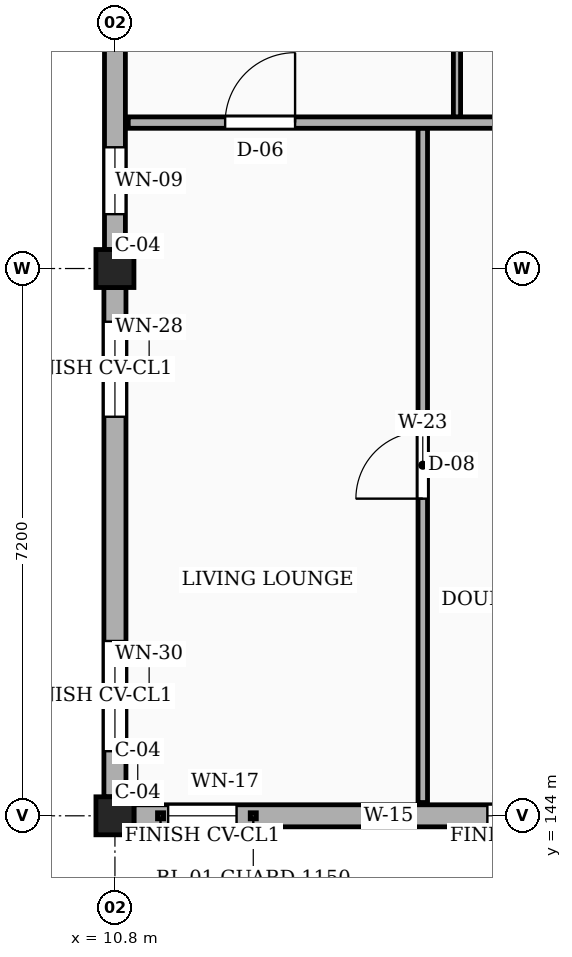
"""IFC4 building model, lengths in metres.
Left out: names, types, materials, properties, quantities, classifications, styles, units other than length and angle.
Written with IfcOpenShell. Run it as: python <this file> out.ifc"""

import sys

from ifc_helpers import new_model, si_unit, direction, frame, frame_2d, origin, origin_2d, place, context, subcontext, project, spatial, rectangle, extrude, element, fill, save


model = new_model("IFC4")
c1 = context("Model", 3, precision=1e-05, world=origin(), true_north=direction((0.0, 1.0)))
c2 = subcontext(c1, "Body", "Model", "MODEL_VIEW")
j1 = project(units=[si_unit("LENGTHUNIT", "METRE"), si_unit("PLANEANGLEUNIT", "RADIAN")], contexts=[c1])
p1 = place(None, origin())
s1 = spatial("IfcSite", under=j1, at=p1, CompositionType="ELEMENT")
p2 = place(p1, origin())
s2 = spatial("IfcBuilding", under=s1, at=p2, CompositionType="ELEMENT")
p3 = place(p2, frame((0.0, 0.0, 32.85)))
s3 = spatial("IfcBuildingStorey", under=s2, at=p3, CompositionType="ELEMENT", Elevation=32.85)
for number, where, z_axis, x_axis in (
    (1, (10.8, 144.0, 0.0), (0.0, 0.0, 1.0), (1.0, 0.0, 0.0)),
    (2, (10.8, 151.2, 0.0), (0.0, 0.0, 1.0), (1.0, 0.0, 0.0)),
):
    element("IfcColumn", number, at=place(p3, frame(where, z_axis=z_axis, x_axis=x_axis)), inside=s3, PredefinedType="COLUMN", context=c2, shape_type="SweptSolid", body=[
        extrude(rectangle(XDim=0.5, YDim=0.5, at=origin_2d()), origin(), (0.0, 0.0, 1.0), 3.15),
    ])
p4 = place(p3, frame((11.05, 144.0, 0.0), z_axis=(0.0, 0.0, 1.0), x_axis=(1.0, 0.0, 0.0)))
e3 = element("IfcWall", 3, at=p4, inside=s3, PredefinedType="SOLIDWALL", context=c2, shape_type="SweptSolid", body=[
    extrude(rectangle(XDim=6.7, YDim=0.29, at=frame_2d((3.35, 0.0))), origin(), (0.0, 0.0, 1.0), 2.455),
])
p5 = place(p4, frame((0.45, 0.0, 0.78)))
e4 = element("IfcOpeningElement", 4, at=p5, cuts=e3, PredefinedType="OPENING", context=c2, shape_type="SweptSolid", body=[
    extrude(rectangle(XDim=0.9, YDim=1.36, at=frame_2d((0.45, 0.68))), frame((0.0, 0.155, 0.0), z_axis=(0.0, -1.0, 0.0), x_axis=(1.0, 0.0, 0.0)), (0.0, 0.0, 1.0), 0.31),
])
p6 = place(p4, frame((4.65, 0.0, 0.78)))
e5 = element("IfcOpeningElement", 5, at=p6, cuts=e3, PredefinedType="OPENING", context=c2, shape_type="SweptSolid", body=[
    extrude(rectangle(XDim=1.06, YDim=1.36, at=frame_2d((0.53, 0.68))), frame((0.0, 0.155, 0.0), z_axis=(0.0, -1.0, 0.0), x_axis=(1.0, 0.0, 0.0)), (0.0, 0.0, 1.0), 0.31),
])
p7 = place(p3, frame((10.8, 158.15, 0.0), z_axis=(0.0, 0.0, 1.0), x_axis=(0.0, -1.0, 0.0)))
e6 = element("IfcWall", 6, at=p7, inside=s3, PredefinedType="SOLIDWALL", context=c2, shape_type="SweptSolid", body=[
    extrude(rectangle(XDim=6.7, YDim=0.275, at=frame_2d((3.35, 0.0))), origin(), (0.0, 0.0, 1.0), 2.455),
])
p8 = place(p7, frame((0.525, 0.0, 0.78)))
e7 = element("IfcOpeningElement", 7, at=p8, cuts=e6, PredefinedType="OPENING", context=c2, shape_type="SweptSolid", body=[
    extrude(rectangle(XDim=0.94, YDim=1.44, at=frame_2d((0.47, 0.72))), frame((0.0, 0.147, 0.0), z_axis=(0.0, -1.0, 0.0), x_axis=(1.0, 0.0, 0.0)), (0.0, 0.0, 1.0), 0.295),
])
p9 = place(p7, frame((2.865, 0.0, 0.78)))
e8 = element("IfcOpeningElement", 8, at=p9, cuts=e6, PredefinedType="OPENING", context=c2, shape_type="SweptSolid", body=[
    extrude(rectangle(XDim=1.15, YDim=1.44, at=frame_2d((0.575, 0.72))), frame((0.0, 0.147, 0.0), z_axis=(0.0, -1.0, 0.0), x_axis=(1.0, 0.0, 0.0)), (0.0, 0.0, 1.0), 0.295),
])
p10 = place(p7, frame((5.355, 0.0, 0.78)))
e9 = element("IfcOpeningElement", 9, at=p10, cuts=e6, PredefinedType="OPENING", context=c2, shape_type="SweptSolid", body=[
    extrude(rectangle(XDim=0.88, YDim=1.26, at=frame_2d((0.44, 0.63))), frame((0.0, 0.147, 0.0), z_axis=(0.0, -1.0, 0.0), x_axis=(1.0, 0.0, 0.0)), (0.0, 0.0, 1.0), 0.295),
])
p11 = place(p3, frame((10.8, 150.95, 0.0), z_axis=(0.0, 0.0, 1.0), x_axis=(0.0, -1.0, 0.0)))
e10 = element("IfcWall", 10, at=p11, inside=s3, PredefinedType="SOLIDWALL", context=c2, shape_type="SweptSolid", body=[
    extrude(rectangle(XDim=6.7, YDim=0.29, at=frame_2d((3.35, 0.0))), origin(), (0.0, 0.0, 1.0), 2.455),
])
p12 = place(p11, frame((0.45, 0.0, 0.78)))
e11 = element("IfcOpeningElement", 11, at=p12, cuts=e10, PredefinedType="OPENING", context=c2, shape_type="SweptSolid", body=[
    extrude(rectangle(XDim=1.25, YDim=1.44, at=frame_2d((0.625, 0.72))), frame((0.0, 0.155, 0.0), z_axis=(0.0, -1.0, 0.0), x_axis=(1.0, 0.0, 0.0)), (0.0, 0.0, 1.0), 0.31),
])
p13 = place(p11, frame((4.65, 0.0, 0.78)))
e12 = element("IfcOpeningElement", 12, at=p13, cuts=e10, PredefinedType="OPENING", context=c2, shape_type="SweptSolid", body=[
    extrude(rectangle(XDim=1.45, YDim=1.44, at=frame_2d((0.725, 0.72))), frame((0.0, 0.155, 0.0), z_axis=(0.0, -1.0, 0.0), x_axis=(1.0, 0.0, 0.0)), (0.0, 0.0, 1.0), 0.31),
])
p14 = place(p3, frame((14.85, 144.175, 0.0), z_axis=(0.0, 0.0, 1.0), x_axis=(0.0, 1.0, 0.0)))
e13 = element("IfcWall", 13, at=p14, inside=s3, PredefinedType="PARTITIONING", context=c2, shape_type="SweptSolid", body=[
    extrude(rectangle(XDim=8.875, YDim=0.125, at=frame_2d((4.438, 0.0))), origin(), (0.0, 0.0, 1.0), 2.32),
])
p15 = place(p14, frame((3.998, 0.0, 0.0)))
e14 = element("IfcOpeningElement", 14, at=p15, cuts=e13, PredefinedType="OPENING", context=c2, shape_type="SweptSolid", body=[
    extrude(rectangle(XDim=0.88, YDim=2.08, at=frame_2d((0.44, 1.04))), frame((0.0, 0.073, 0.0), z_axis=(0.0, -1.0, 0.0), x_axis=(1.0, 0.0, 0.0)), (0.0, 0.0, 1.0), 0.145),
])
p16 = place(p3, frame((15.3, 153.19, 0.0), z_axis=(0.0, 0.0, 1.0), x_axis=(0.0, 1.0, 0.0)))
e15 = element("IfcWall", 15, at=p16, inside=s3, PredefinedType="PARTITIONING", context=c2, shape_type="SweptSolid", body=[
    extrude(rectangle(XDim=3.02, YDim=0.095, at=frame_2d((1.51, 0.0))), origin(), (0.0, 0.0, 1.0), 2.32),
])
p17 = place(p16, frame((1.075, 0.0, 0.0)))
e16 = element("IfcOpeningElement", 16, at=p17, cuts=e15, PredefinedType="OPENING", context=c2, shape_type="SweptSolid", body=[
    extrude(rectangle(XDim=0.87, YDim=2.05, at=frame_2d((0.435, 1.025))), frame((0.0, 0.058, 0.0), z_axis=(0.0, -1.0, 0.0), x_axis=(1.0, 0.0, 0.0)), (0.0, 0.0, 1.0), 0.115),
])
p18 = place(p3, frame((10.975, 153.12, 0.0), z_axis=(0.0, 0.0, 1.0), x_axis=(1.0, 0.0, 0.0)))
e17 = element("IfcWall", 17, at=p18, inside=s3, PredefinedType="PARTITIONING", context=c2, shape_type="SweptSolid", body=[
    extrude(rectangle(XDim=6.885, YDim=0.15, at=frame_2d((3.442, 0.0))), origin(), (0.0, 0.0, 1.0), 2.32),
])
p19 = place(p18, frame((1.275, 0.0, 0.0)))
e18 = element("IfcOpeningElement", 18, at=p19, cuts=e17, PredefinedType="OPENING", context=c2, shape_type="SweptSolid", body=[
    extrude(rectangle(XDim=0.92, YDim=2.1, at=frame_2d((0.46, 1.05))), frame((0.0, 0.085, 0.0), z_axis=(0.0, -1.0, 0.0), x_axis=(1.0, 0.0, 0.0)), (0.0, 0.0, 1.0), 0.17),
])
p20 = place(p5, origin())
e19 = element("IfcWindow", 19, at=p20, inside=s3, PartitioningType="SINGLE_PANEL", PredefinedType="WINDOW", context=c2, shape_type="SweptSolid", body=[
    extrude(rectangle(XDim=0.9, YDim=1.36, at=frame_2d((0.45, 0.68))), frame((0.0, 0.03, 0.0), z_axis=(0.0, -1.0, 0.0), x_axis=(1.0, 0.0, 0.0)), (0.0, 0.0, 1.0), 0.06),
])
fill(e4, e19)
p21 = place(p6, origin())
e20 = element("IfcWindow", 20, at=p21, inside=s3, PartitioningType="SINGLE_PANEL", PredefinedType="WINDOW", context=c2, shape_type="SweptSolid", body=[
    extrude(rectangle(XDim=1.06, YDim=1.36, at=frame_2d((0.53, 0.68))), frame((0.0, 0.03, 0.0), z_axis=(0.0, -1.0, 0.0), x_axis=(1.0, 0.0, 0.0)), (0.0, 0.0, 1.0), 0.06),
])
fill(e5, e20)
p22 = place(p10, origin())
e21 = element("IfcWindow", 21, at=p22, inside=s3, PartitioningType="SINGLE_PANEL", PredefinedType="WINDOW", context=c2, shape_type="SweptSolid", body=[
    extrude(rectangle(XDim=0.88, YDim=1.26, at=frame_2d((0.44, 0.63))), frame((0.0, 0.03, 0.0), z_axis=(0.0, -1.0, 0.0), x_axis=(1.0, 0.0, 0.0)), (0.0, 0.0, 1.0), 0.06),
])
fill(e9, e21)
p23 = place(p12, origin())
e22 = element("IfcWindow", 22, at=p23, inside=s3, PartitioningType="SINGLE_PANEL", PredefinedType="WINDOW", context=c2, shape_type="SweptSolid", body=[
    extrude(rectangle(XDim=1.25, YDim=1.44, at=frame_2d((0.625, 0.72))), frame((0.0, 0.03, 0.0), z_axis=(0.0, -1.0, 0.0), x_axis=(1.0, 0.0, 0.0)), (0.0, 0.0, 1.0), 0.06),
])
fill(e11, e22)
p24 = place(p13, origin())
e23 = element("IfcWindow", 23, at=p24, inside=s3, PartitioningType="SINGLE_PANEL", PredefinedType="WINDOW", context=c2, shape_type="SweptSolid", body=[
    extrude(rectangle(XDim=1.45, YDim=1.44, at=frame_2d((0.725, 0.72))), frame((0.0, 0.03, 0.0), z_axis=(0.0, -1.0, 0.0), x_axis=(1.0, 0.0, 0.0)), (0.0, 0.0, 1.0), 0.06),
])
fill(e12, e23)
p25 = place(p15, origin())
e24 = element("IfcDoor", 24, at=p25, inside=s3, OperationType="SINGLE_SWING_LEFT", PredefinedType="DOOR", context=c2, shape_type="SweptSolid", body=[
    extrude(rectangle(XDim=0.88, YDim=2.08, at=frame_2d((0.44, 1.04))), frame((0.0, 0.025, 0.0), z_axis=(0.0, -1.0, 0.0), x_axis=(1.0, 0.0, 0.0)), (0.0, 0.0, 1.0), 0.05),
])
fill(e14, e24)
p26 = place(p19, origin())
e25 = element("IfcDoor", 25, at=p26, inside=s3, OperationType="SINGLE_SWING_RIGHT", PredefinedType="DOOR", context=c2, shape_type="SweptSolid", body=[
    extrude(rectangle(XDim=0.92, YDim=2.1, at=frame_2d((0.46, 1.05))), frame((0.0, 0.025, 0.0), z_axis=(0.0, -1.0, 0.0), x_axis=(1.0, 0.0, 0.0)), (0.0, 0.0, 1.0), 0.05),
])
fill(e18, e25)
save(model, sys.argv[1])
